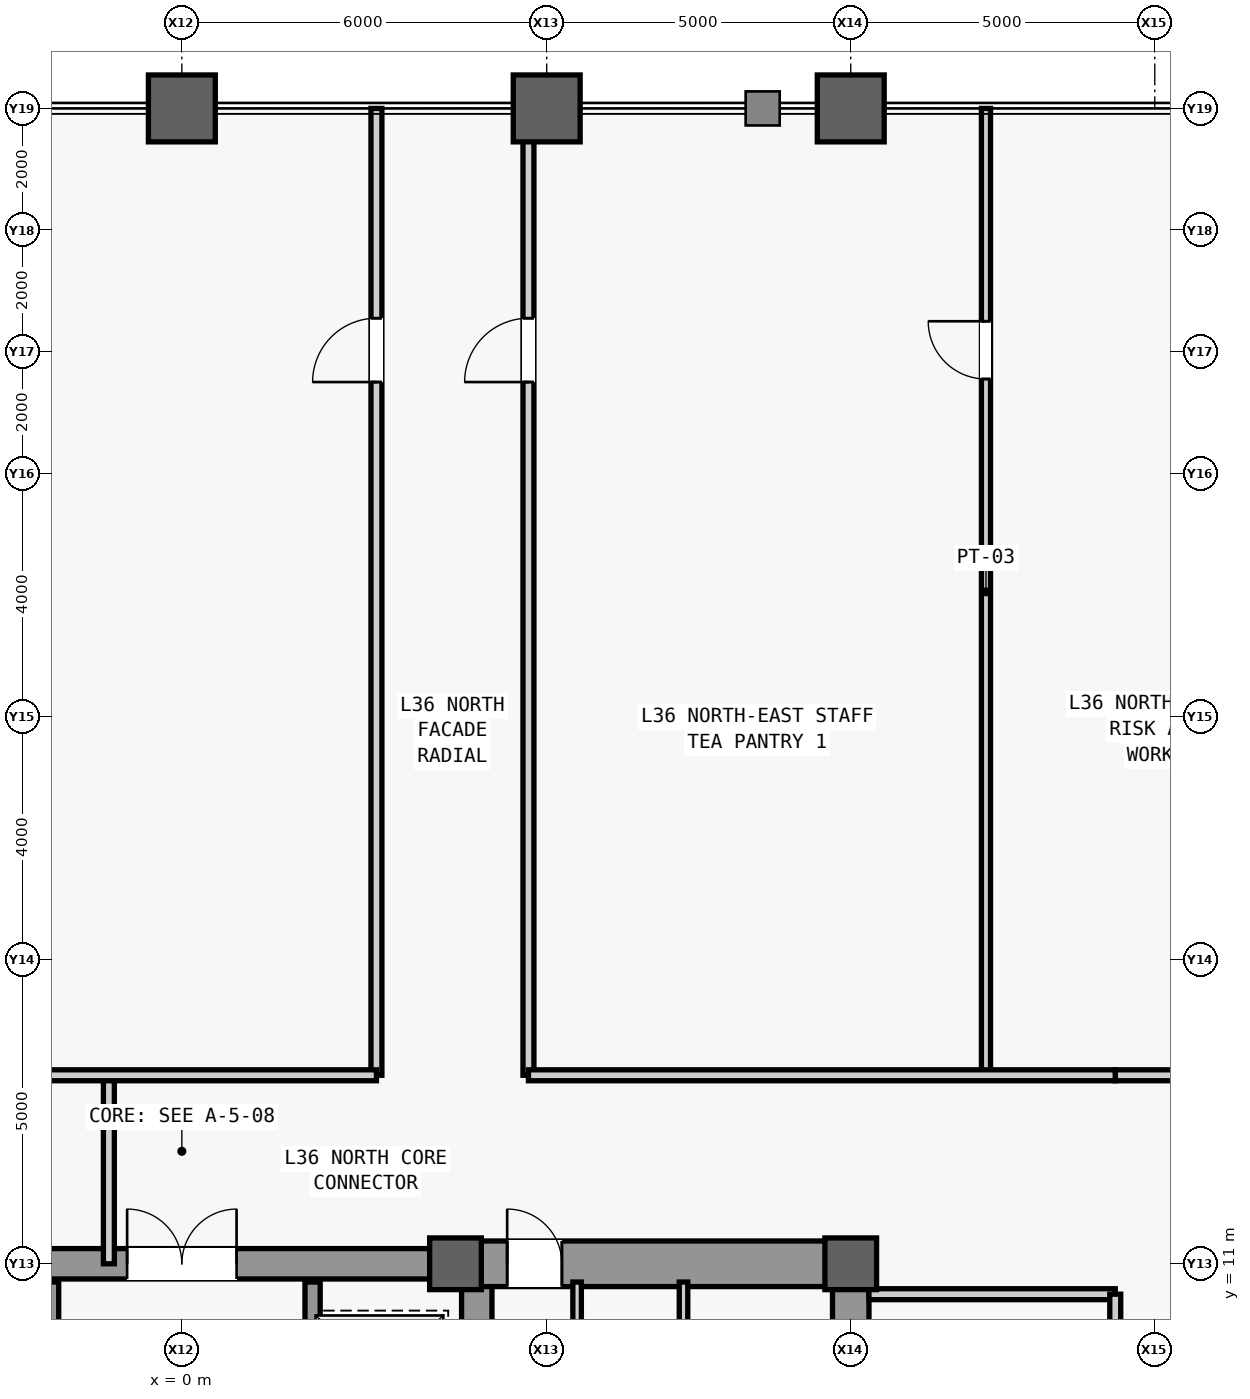
"""IFC4 building model, lengths in metres.
Left out: names, types, materials, properties, quantities, classifications, styles, units other than length and angle.
Written with IfcOpenShell. Run it as: python <this file> out.ifc"""

import sys

from ifc_helpers import new_model, si_unit, direction, frame, frame_2d, origin, origin_2d, place, context, subcontext, project, spatial, rectangle, hollow_rectangle, extrude, source, transform, mapped, element, fill, save


model = new_model("IFC4")
c1 = context("Model", 3, precision=1e-05, world=origin(), true_north=direction((0.0, 1.0)))
c2 = subcontext(c1, "Body", "Model", "MODEL_VIEW")
j1 = project(units=[si_unit("LENGTHUNIT", "METRE"), si_unit("PLANEANGLEUNIT", "RADIAN")], contexts=[c1])
p1 = place(None, origin())
s1 = spatial("IfcSite", under=j1, at=p1, CompositionType="ELEMENT")
p2 = place(p1, origin())
s2 = spatial("IfcBuilding", under=s1, at=p2, CompositionType="ELEMENT")
p3 = place(p2, frame((0.0, 0.0, 159.1)))
s3 = spatial("IfcBuildingStorey", under=s2, at=p3, CompositionType="ELEMENT", Elevation=159.1)
m1 = source(origin(), c2, "Body", "SweptSolid", [
    extrude(rectangle(XDim=22.0, YDim=0.6, at=frame_2d((11.0, 0.0))), origin(), (0.0, 0.0, 1.0), 3.78),
])
p4 = place(p3, frame((11.0, -11.0, 0.0), z_axis=(0.0, 0.0, 1.0), x_axis=(0.0, 1.0, 0.0)))
e1 = element("IfcWall", 1, at=p4, inside=s3, PredefinedType="SHEAR", context=c2, shape_type="MappedRepresentation", body=[
    mapped(m1, transform((0.0, 0.0, 0.0), scale=1.0)),
])
m2 = source(origin(), c2, "Body", "SweptSolid", [
    extrude(rectangle(XDim=1.1, YDim=2.2, at=frame_2d((0.55, 1.1))), frame((0.0, 0.31, 0.0), z_axis=(0.0, -1.0, 0.0), x_axis=(1.0, 0.0, 0.0)), (0.0, 0.0, 1.0), 0.62),
])
p5 = place(p4, frame((0.8, 0.0, 0.0)))
e2 = element("IfcOpeningElement", 2, at=p5, cuts=e1, PredefinedType="OPENING", context=c2, shape_type="MappedRepresentation", body=[
    mapped(m2, transform((0.0, 0.0, 0.0), scale=1.0)),
])
m3 = source(origin(), c2, "Body", "SweptSolid", [
    extrude(rectangle(XDim=0.9, YDim=2.15, at=frame_2d((0.45, 1.075))), frame((0.0, 0.31, 0.0), z_axis=(0.0, -1.0, 0.0), x_axis=(1.0, 0.0, 0.0)), (0.0, 0.0, 1.0), 0.62),
])
p6 = place(p4, frame((7.575, 0.0, 0.0)))
e3 = element("IfcOpeningElement", 3, at=p6, cuts=e1, PredefinedType="OPENING", context=c2, shape_type="MappedRepresentation", body=[
    mapped(m3, transform((0.0, 0.0, 0.0), scale=1.0)),
])
m4 = source(origin(), c2, "Body", "SweptSolid", [
    extrude(rectangle(XDim=1.3, YDim=2.3, at=frame_2d((0.65, 1.15))), frame((0.0, 0.31, 0.0), z_axis=(0.0, -1.0, 0.0), x_axis=(1.0, 0.0, 0.0)), (0.0, 0.0, 1.0), 0.62),
])
p7 = place(p4, frame((2.7, 0.0, 0.0)))
e4 = element("IfcOpeningElement", 4, at=p7, cuts=e1, PredefinedType="OPENING", context=c2, shape_type="MappedRepresentation", body=[
    mapped(m4, transform((0.0, 0.0, 0.0), scale=1.0)),
])
p8 = place(p4, frame((13.35, 0.0, 0.0)))
e5 = element("IfcOpeningElement", 5, at=p8, cuts=e1, PredefinedType="OPENING", context=c2, shape_type="MappedRepresentation", body=[
    mapped(m4, transform((0.0, 0.0, 0.0), scale=1.0)),
])
m5 = source(origin(), c2, "Body", "SweptSolid", [
    extrude(rectangle(XDim=21.4, YDim=0.5, at=frame_2d((10.7, 0.0))), origin(), (0.0, 0.0, 1.0), 3.78),
])
p9 = place(p3, frame((4.85, -10.7, 0.0), z_axis=(0.0, 0.0, 1.0), x_axis=(0.0, 1.0, 0.0)))
e6 = element("IfcWall", 6, at=p9, inside=s3, PredefinedType="SHEAR", context=c2, shape_type="MappedRepresentation", body=[
    mapped(m5, transform((0.0, 0.0, 0.0), scale=1.0)),
])
m6 = source(origin(), c2, "Body", "SweptSolid", [
    extrude(rectangle(XDim=5.85, YDim=0.75, at=frame_2d((2.925, 0.0))), origin(), (0.0, 0.0, 1.0), 3.78),
])
p10 = place(p3, frame((4.85, 11.0, 0.0), z_axis=(0.0, 0.0, 1.0), x_axis=(1.0, 0.0, 0.0)))
e7 = element("IfcWall", 7, at=p10, inside=s3, PredefinedType="SHEAR", context=c2, shape_type="MappedRepresentation", body=[
    mapped(m6, transform((0.0, 0.0, 0.0), scale=1.0)),
])
m7 = source(origin(), c2, "Body", "SweptSolid", [
    extrude(rectangle(XDim=0.9, YDim=2.15, at=frame_2d((0.45, 1.075))), frame((0.0, 0.385, 0.0), z_axis=(0.0, -1.0, 0.0), x_axis=(1.0, 0.0, 0.0)), (0.0, 0.0, 1.0), 0.77),
])
p11 = place(p10, frame((0.5, 0.0, 0.0)))
e8 = element("IfcOpeningElement", 8, at=p11, cuts=e7, PredefinedType="OPENING", context=c2, shape_type="MappedRepresentation", body=[
    mapped(m7, transform((0.0, 0.0, 0.0), scale=1.0)),
])
m8 = source(origin(), c2, "Body", "SweptSolid", [
    extrude(rectangle(XDim=9.2, YDim=0.5, at=frame_2d((4.6, 0.0))), origin(), (0.0, 0.0, 1.0), 3.78),
])
p12 = place(p3, frame((-4.6, 11.0, 0.0), z_axis=(0.0, 0.0, 1.0), x_axis=(1.0, 0.0, 0.0)))
e9 = element("IfcWall", 9, at=p12, inside=s3, PredefinedType="SHEAR", context=c2, shape_type="MappedRepresentation", body=[
    mapped(m8, transform((0.0, 0.0, 0.0), scale=1.0)),
])
m9 = source(origin(), c2, "Body", "SweptSolid", [
    extrude(rectangle(XDim=1.8, YDim=2.25, at=frame_2d((0.9, 1.125))), frame((0.0, 0.26, 0.0), z_axis=(0.0, -1.0, 0.0), x_axis=(1.0, 0.0, 0.0)), (0.0, 0.0, 1.0), 0.52),
])
p13 = place(p12, frame((3.7, 0.0, 0.0)))
e10 = element("IfcOpeningElement", 10, at=p13, cuts=e9, PredefinedType="OPENING", context=c2, shape_type="MappedRepresentation", body=[
    mapped(m9, transform((0.0, 0.0, 0.0), scale=1.0)),
])
m10 = source(origin(), c2, "Body", "SweptSolid", [
    extrude(hollow_rectangle(XDim=1.1, YDim=1.1, WallThickness=0.06, at=origin_2d()), origin(), (0.0, 0.0, 1.0), 4.0),
])
p14 = place(p3, frame((0.0, 30.0, 0.0), z_axis=(0.0, 0.0, 1.0), x_axis=(1.0, 0.0, 0.0)))
e11 = element("IfcColumn", 11, at=p14, inside=s3, PredefinedType="COLUMN", context=c2, shape_type="MappedRepresentation", body=[
    mapped(m10, transform((0.0, 0.0, 0.0), scale=1.0)),
])
m11 = source(origin(), c2, "Body", "SweptSolid", [
    extrude(rectangle(XDim=0.85, YDim=0.85, at=origin_2d()), origin(), (0.0, 0.0, 1.0), 4.0),
])
p15 = place(p3, frame((4.5, 11.0, 0.0), z_axis=(0.0, 0.0, 1.0), x_axis=(1.0, 0.0, 0.0)))
e12 = element("IfcColumn", 12, at=p15, inside=s3, PredefinedType="COLUMN", context=c2, shape_type="MappedRepresentation", body=[
    mapped(m11, transform((0.0, 0.0, 0.0), scale=1.0)),
])
p16 = place(p3, frame((6.0, 30.0, 0.0), z_axis=(0.0, 0.0, 1.0), x_axis=(1.0, 0.0, 0.0)))
e13 = element("IfcColumn", 13, at=p16, inside=s3, PredefinedType="COLUMN", context=c2, shape_type="MappedRepresentation", body=[
    mapped(m10, transform((0.0, 0.0, 0.0), scale=1.0)),
])
p17 = place(p3, frame((11.0, 11.0, 0.0), z_axis=(0.0, 0.0, 1.0), x_axis=(1.0, 0.0, 0.0)))
e14 = element("IfcColumn", 14, at=p17, inside=s3, PredefinedType="COLUMN", context=c2, shape_type="MappedRepresentation", body=[
    mapped(m11, transform((0.0, 0.0, 0.0), scale=1.0)),
])
p18 = place(p3, frame((11.0, 30.0, 0.0), z_axis=(0.0, 0.0, 1.0), x_axis=(1.0, 0.0, 0.0)))
e15 = element("IfcColumn", 15, at=p18, inside=s3, PredefinedType="COLUMN", context=c2, shape_type="MappedRepresentation", body=[
    mapped(m10, transform((0.0, 0.0, 0.0), scale=1.0)),
])
m12 = source(origin(), c2, "Body", "SweptSolid", [
    extrude(rectangle(XDim=9.4, YDim=0.14, at=frame_2d((4.7, 0.0))), origin(), (0.0, 0.0, 1.0), 3.78),
])
p19 = place(p3, frame((8.25, 1.3, 0.0), z_axis=(0.0, 0.0, 1.0), x_axis=(0.0, 1.0, 0.0)))
e16 = element("IfcWall", 16, at=p19, inside=s3, PredefinedType="PARTITIONING", context=c2, shape_type="MappedRepresentation", body=[
    mapped(m12, transform((0.0, 0.0, 0.0), scale=1.0)),
])
m13 = source(origin(), c2, "Body", "SweptSolid", [
    extrude(rectangle(XDim=5.7, YDim=0.14, at=frame_2d((2.85, 0.0))), origin(), (0.0, 0.0, 1.0), 3.78),
])
p20 = place(p3, frame((6.5, 5.0, 0.0), z_axis=(0.0, 0.0, 1.0), x_axis=(0.0, 1.0, 0.0)))
e17 = element("IfcWall", 17, at=p20, inside=s3, PredefinedType="PARTITIONING", context=c2, shape_type="MappedRepresentation", body=[
    mapped(m13, transform((0.0, 0.0, 0.0), scale=1.0)),
])
m14 = source(origin(), c2, "Body", "SweptSolid", [
    extrude(rectangle(XDim=0.9, YDim=2.15, at=frame_2d((0.45, 1.075))), frame((0.0, 0.08, 0.0), z_axis=(0.0, -1.0, 0.0), x_axis=(1.0, 0.0, 0.0)), (0.0, 0.0, 1.0), 0.16),
])
p21 = place(p20, frame((2.05, 0.0, 0.0)))
e18 = element("IfcOpeningElement", 18, at=p21, cuts=e17, PredefinedType="OPENING", context=c2, shape_type="MappedRepresentation", body=[
    mapped(m14, transform((0.0, 0.0, 0.0), scale=1.0)),
])
m15 = source(origin(), c2, "Body", "SweptSolid", [
    extrude(rectangle(XDim=4.05, YDim=0.18, at=frame_2d((2.025, 0.0))), origin(), (0.0, 0.0, 1.0), 3.78),
])
p22 = place(p3, frame((11.3, 10.5, 0.0), z_axis=(0.0, 0.0, 1.0), x_axis=(1.0, 0.0, 0.0)))
e19 = element("IfcWall", 19, at=p22, inside=s3, PredefinedType="PARTITIONING", context=c2, shape_type="MappedRepresentation", body=[
    mapped(m15, transform((0.0, 0.0, 0.0), scale=1.0)),
])
m16 = source(origin(), c2, "Body", "SweptSolid", [
    extrude(rectangle(XDim=16.6, YDim=0.18, at=frame_2d((8.3, 0.0))), origin(), (0.0, 0.0, 1.0), 3.78),
])
p23 = place(p3, frame((15.35, -6.1, 0.0), z_axis=(0.0, 0.0, 1.0), x_axis=(0.0, 1.0, 0.0)))
e20 = element("IfcWall", 20, at=p23, inside=s3, PredefinedType="PARTITIONING", context=c2, shape_type="MappedRepresentation", body=[
    mapped(m16, transform((0.0, 0.0, 0.0), scale=1.0)),
])
m17 = source(origin(), c2, "Body", "SweptSolid", [
    extrude(rectangle(XDim=1.8, YDim=2.25, at=frame_2d((0.9, 1.125))), frame((0.0, 0.1, 0.0), z_axis=(0.0, -1.0, 0.0), x_axis=(1.0, 0.0, 0.0)), (0.0, 0.0, 1.0), 0.2),
])
p24 = place(p23, frame((2.7, 0.0, 0.0)))
e21 = element("IfcOpeningElement", 21, at=p24, cuts=e20, PredefinedType="OPENING", context=c2, shape_type="MappedRepresentation", body=[
    mapped(m17, transform((0.0, 0.0, 0.0), scale=1.0)),
])
p25 = place(p23, frame((13.0, 0.0, 0.0)))
e22 = element("IfcOpeningElement", 22, at=p25, cuts=e20, PredefinedType="OPENING", context=c2, shape_type="MappedRepresentation", body=[
    mapped(m17, transform((0.0, 0.0, 0.0), scale=1.0)),
])
m18 = source(origin(), c2, "Body", "SweptSolid", [
    extrude(rectangle(XDim=5.4, YDim=0.25, at=frame_2d((2.7, 0.0))), origin(), (0.0, 0.0, 1.0), 3.78),
])
p26 = place(p3, frame((-2.15, 5.3, 0.0), z_axis=(0.0, 0.0, 1.0), x_axis=(0.0, 1.0, 0.0)))
e23 = element("IfcWall", 23, at=p26, inside=s3, PredefinedType="SHEAR", context=c2, shape_type="MappedRepresentation", body=[
    mapped(m18, transform((0.0, 0.0, 0.0), scale=1.0)),
])
m19 = source(origin(), c2, "Body", "SweptSolid", [
    extrude(rectangle(XDim=1.2, YDim=2.3, at=frame_2d((0.6, 1.15))), frame((0.0, 0.135, 0.0), z_axis=(0.0, -1.0, 0.0), x_axis=(1.0, 0.0, 0.0)), (0.0, 0.0, 1.0), 0.27),
])
p27 = place(p26, frame((3.3, 0.0, 0.0)))
e24 = element("IfcOpeningElement", 24, at=p27, cuts=e23, PredefinedType="OPENING", context=c2, shape_type="MappedRepresentation", body=[
    mapped(m19, transform((0.0, 0.0, 0.0), scale=1.0)),
])
p28 = place(p26, frame((0.9, 0.0, 0.0)))
e25 = element("IfcOpeningElement", 25, at=p28, cuts=e23, PredefinedType="OPENING", context=c2, shape_type="MappedRepresentation", body=[
    mapped(m19, transform((0.0, 0.0, 0.0), scale=1.0)),
])
p29 = place(p3, frame((2.15, 5.3, 0.0), z_axis=(0.0, 0.0, 1.0), x_axis=(0.0, 1.0, 0.0)))
e26 = element("IfcWall", 26, at=p29, inside=s3, PredefinedType="SHEAR", context=c2, shape_type="MappedRepresentation", body=[
    mapped(m18, transform((0.0, 0.0, 0.0), scale=1.0)),
])
p30 = place(p29, frame((3.3, 0.0, 0.0)))
e27 = element("IfcOpeningElement", 27, at=p30, cuts=e26, PredefinedType="OPENING", context=c2, shape_type="MappedRepresentation", body=[
    mapped(m19, transform((0.0, 0.0, 0.0), scale=1.0)),
])
p31 = place(p29, frame((0.9, 0.0, 0.0)))
e28 = element("IfcOpeningElement", 28, at=p31, cuts=e26, PredefinedType="OPENING", context=c2, shape_type="MappedRepresentation", body=[
    mapped(m19, transform((0.0, 0.0, 0.0), scale=1.0)),
])
m20 = source(origin(), c2, "Body", "SweptSolid", [
    extrude(rectangle(XDim=2.45, YDim=0.18, at=frame_2d((1.225, 0.0))), origin(), (0.0, 0.0, 1.0), 3.78),
])
p32 = place(p3, frame((15.35, 14.1, 0.0), z_axis=(0.0, 0.0, 1.0), x_axis=(1.0, 0.0, 0.0)))
e29 = element("IfcWall", 29, at=p32, inside=s3, PredefinedType="PARTITIONING", context=c2, shape_type="MappedRepresentation", body=[
    mapped(m20, transform((0.0, 0.0, 0.0), scale=1.0)),
])
m21 = source(origin(), c2, "Body", "SweptSolid", [
    extrude(rectangle(XDim=3.1, YDim=0.18, at=frame_2d((1.55, 0.0))), origin(), (0.0, 0.0, 1.0), 3.78),
])
p33 = place(p3, frame((-1.2, 11.0, 0.0), z_axis=(0.0, 0.0, 1.0), x_axis=(0.0, 1.0, 0.0)))
e30 = element("IfcWall", 30, at=p33, inside=s3, PredefinedType="PARTITIONING", context=c2, shape_type="MappedRepresentation", body=[
    mapped(m21, transform((0.0, 0.0, 0.0), scale=1.0)),
])
m22 = source(origin(), c2, "Body", "SweptSolid", [
    extrude(rectangle(XDim=15.9, YDim=0.18, at=frame_2d((7.95, 0.0))), origin(), (0.0, 0.0, 1.0), 3.78),
])
p34 = place(p3, frame((3.2, 14.1, 0.0), z_axis=(0.0, 0.0, 1.0), x_axis=(0.0, 1.0, 0.0)))
e31 = element("IfcWall", 31, at=p34, inside=s3, PredefinedType="PARTITIONING", context=c2, shape_type="MappedRepresentation", body=[
    mapped(m22, transform((0.0, 0.0, 0.0), scale=1.0)),
])
m23 = source(origin(), c2, "Body", "SweptSolid", [
    extrude(rectangle(XDim=1.05, YDim=2.2, at=frame_2d((0.525, 1.1))), frame((0.0, 0.1, 0.0), z_axis=(0.0, -1.0, 0.0), x_axis=(1.0, 0.0, 0.0)), (0.0, 0.0, 1.0), 0.2),
])
p35 = place(p34, frame((11.4, 0.0, 0.0)))
e32 = element("IfcOpeningElement", 32, at=p35, cuts=e31, PredefinedType="OPENING", context=c2, shape_type="MappedRepresentation", body=[
    mapped(m23, transform((0.0, 0.0, 0.0), scale=1.0)),
])
m24 = source(origin(), c2, "Body", "SweptSolid", [
    extrude(rectangle(XDim=18.55, YDim=0.18, at=frame_2d((9.275, 0.0))), origin(), (0.0, 0.0, 1.0), 3.78),
])
p36 = place(p3, frame((-15.35, 14.1, 0.0), z_axis=(0.0, 0.0, 1.0), x_axis=(1.0, 0.0, 0.0)))
e33 = element("IfcWall", 33, at=p36, inside=s3, PredefinedType="PARTITIONING", context=c2, shape_type="MappedRepresentation", body=[
    mapped(m24, transform((0.0, 0.0, 0.0), scale=1.0)),
])
m25 = source(origin(), c2, "Body", "SweptSolid", [
    extrude(rectangle(XDim=15.9, YDim=0.15, at=frame_2d((7.95, 0.0))), origin(), (0.0, 0.0, 1.0), 3.78),
])
p37 = place(p3, frame((13.224, 14.1, 0.0), z_axis=(0.0, 0.0, 1.0), x_axis=(0.0, 1.0, 0.0)))
e34 = element("IfcWall", 34, at=p37, inside=s3, PredefinedType="PARTITIONING", context=c2, shape_type="MappedRepresentation", body=[
    mapped(m25, transform((0.0, 0.0, 0.0), scale=1.0)),
])
m26 = source(origin(), c2, "Body", "SweptSolid", [
    extrude(rectangle(XDim=0.95, YDim=2.15, at=frame_2d((0.475, 1.075))), frame((0.0, 0.085, 0.0), z_axis=(0.0, -1.0, 0.0), x_axis=(1.0, 0.0, 0.0)), (0.0, 0.0, 1.0), 0.17),
])
p38 = place(p37, frame((11.45, 0.0, 0.0)))
e35 = element("IfcOpeningElement", 35, at=p38, cuts=e34, PredefinedType="OPENING", context=c2, shape_type="MappedRepresentation", body=[
    mapped(m26, transform((0.0, 0.0, 0.0), scale=1.0)),
])
m27 = source(origin(), c2, "Body", "SweptSolid", [
    extrude(rectangle(XDim=15.9, YDim=0.18, at=frame_2d((7.95, 0.0))), origin(), (0.0, 0.0, 1.0), 3.007),
])
p39 = place(p3, frame((5.7, 14.1, 0.0), z_axis=(0.0, 0.0, 1.0), x_axis=(0.0, 1.0, 0.0)))
e36 = element("IfcWall", 36, at=p39, inside=s3, PredefinedType="PARTITIONING", context=c2, shape_type="MappedRepresentation", body=[
    mapped(m27, transform((0.0, 0.0, 0.0), scale=1.0)),
])
p40 = place(p39, frame((11.4, 0.0, 0.0)))
e37 = element("IfcOpeningElement", 37, at=p40, cuts=e36, PredefinedType="OPENING", context=c2, shape_type="MappedRepresentation", body=[
    mapped(m23, transform((0.0, 0.0, 0.0), scale=1.0)),
])
m28 = source(origin(), c2, "Body", "SweptSolid", [
    extrude(rectangle(XDim=9.65, YDim=0.18, at=frame_2d((4.825, 0.0))), origin(), (0.0, 0.0, 1.0), 3.78),
])
p41 = place(p3, frame((5.7, 14.1, 0.0), z_axis=(0.0, 0.0, 1.0), x_axis=(1.0, 0.0, 0.0)))
e38 = element("IfcWall", 38, at=p41, inside=s3, PredefinedType="PARTITIONING", context=c2, shape_type="MappedRepresentation", body=[
    mapped(m28, transform((0.0, 0.0, 0.0), scale=1.0)),
])
m29 = source(origin(), c2, "Body", "SweptSolid", [
    extrude(rectangle(XDim=0.9, YDim=2.15, at=frame_2d((0.45, 1.075))), frame((0.0, 0.025, 0.0), z_axis=(0.0, -1.0, 0.0), x_axis=(1.0, 0.0, 0.0)), (0.0, 0.0, 1.0), 0.05),
])
p42 = place(p11, origin())
e39 = element("IfcDoor", 39, at=p42, inside=s3, OperationType="SINGLE_SWING_LEFT", PredefinedType="DOOR", context=c2, shape_type="MappedRepresentation", body=[
    mapped(m29, transform((0.0, 0.0, 0.0), scale=1.0)),
])
fill(e8, e39)
m30 = source(origin(), c2, "Body", "SweptSolid", [
    extrude(rectangle(XDim=1.8, YDim=2.25, at=frame_2d((0.9, 1.125))), frame((0.0, 0.025, 0.0), z_axis=(0.0, -1.0, 0.0), x_axis=(1.0, 0.0, 0.0)), (0.0, 0.0, 1.0), 0.05),
])
p43 = place(p13, origin())
e40 = element("IfcDoor", 40, at=p43, inside=s3, OperationType="SINGLE_SWING_RIGHT", PredefinedType="DOOR", context=c2, shape_type="MappedRepresentation", body=[
    mapped(m30, transform((0.0, 0.0, 0.0), scale=1.0)),
])
fill(e10, e40)
m31 = source(origin(), c2, "Body", "SweptSolid", [
    extrude(rectangle(XDim=1.05, YDim=2.2, at=frame_2d((0.525, 1.1))), frame((0.0, 0.025, 0.0), z_axis=(0.0, -1.0, 0.0), x_axis=(1.0, 0.0, 0.0)), (0.0, 0.0, 1.0), 0.05),
])
p44 = place(p35, origin())
e41 = element("IfcDoor", 41, at=p44, inside=s3, OperationType="SINGLE_SWING_LEFT", PredefinedType="DOOR", context=c2, shape_type="MappedRepresentation", body=[
    mapped(m31, transform((0.0, 0.0, 0.0), scale=1.0)),
])
fill(e32, e41)
m32 = source(origin(), c2, "Body", "SweptSolid", [
    extrude(rectangle(XDim=0.95, YDim=2.15, at=frame_2d((0.475, 1.075))), frame((0.0, 0.025, 0.0), z_axis=(0.0, -1.0, 0.0), x_axis=(1.0, 0.0, 0.0)), (0.0, 0.0, 1.0), 0.05),
])
p45 = place(p38, origin())
e42 = element("IfcDoor", 42, at=p45, inside=s3, OperationType="SINGLE_SWING_RIGHT", PredefinedType="DOOR", context=c2, shape_type="MappedRepresentation", body=[
    mapped(m32, transform((0.0, 0.0, 0.0), scale=1.0)),
])
fill(e35, e42)
p46 = place(p40, origin())
e43 = element("IfcDoor", 43, at=p46, inside=s3, OperationType="SINGLE_SWING_LEFT", PredefinedType="DOOR", context=c2, shape_type="MappedRepresentation", body=[
    mapped(m31, transform((0.0, 0.0, 0.0), scale=1.0)),
])
fill(e37, e43)
save(model, sys.argv[1])
